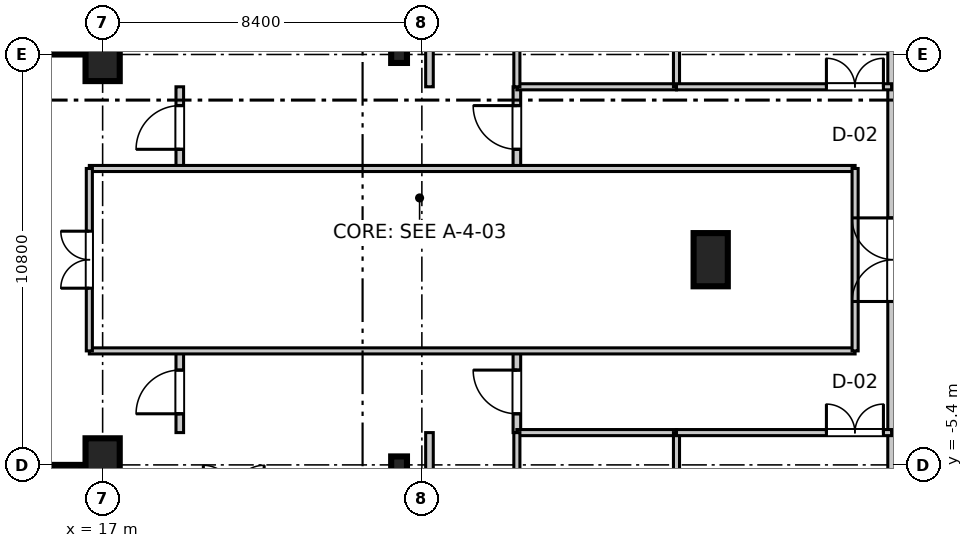
"""IFC4 building model, lengths in metres.
Left out: names, types, materials, properties, quantities, classifications, styles, units other than length and angle.
Written with IfcOpenShell. Run it as: python <this file> out.ifc"""

import sys

from ifc_helpers import new_model, si_unit, direction, frame, frame_2d, origin, origin_2d, place, context, subcontext, project, spatial, rectangle, i_section, extrude, source, transform, mapped, element, fill, save


model = new_model("IFC4")
c1 = context("Model", 3, precision=1e-05, world=origin(), true_north=direction((0.0, 1.0)))
c2 = subcontext(c1, "Body", "Model", "MODEL_VIEW")
j1 = project(units=[si_unit("LENGTHUNIT", "METRE"), si_unit("PLANEANGLEUNIT", "RADIAN")], contexts=[c1])
p1 = place(None, origin())
s1 = spatial("IfcSite", under=j1, at=p1, CompositionType="ELEMENT")
p2 = place(p1, origin())
s2 = spatial("IfcBuilding", under=s1, at=p2, CompositionType="ELEMENT")
p3 = place(p2, origin())
s3 = spatial("IfcBuildingStorey", under=s2, at=p3, CompositionType="ELEMENT", Elevation=0.0)
m1 = source(origin(), c2, "Body", "SweptSolid", [
    extrude(rectangle(XDim=0.9, YDim=1.4, at=origin_2d()), origin(), (0.0, 0.0, 1.0), 5.355),
])
for number, where, z_axis, x_axis in (
    (1, (17.0, -5.4, 0.0), (0.0, 0.0, 1.0), (1.0, 0.0, 0.0)),
    (2, (17.0, 5.4, 0.0), (0.0, 0.0, 1.0), (1.0, 0.0, 0.0)),
    (3, (33.0, 0.0, 0.0), (0.0, 0.0, 1.0), (1.0, 0.0, 0.0)),
):
    element("IfcColumn", number, at=place(p3, frame(where, z_axis=z_axis, x_axis=x_axis)), inside=s3, PredefinedType="PILASTER", context=c2, shape_type="MappedRepresentation", body=[
        mapped(m1, transform((0.0, 0.0, 0.0), scale=1.0)),
    ])
m2 = source(origin(), c2, "Body", "SweptSolid", [
    extrude(i_section(OverallWidth=0.416, OverallDepth=0.446, WebThickness=0.025, FlangeThickness=0.04, at=origin_2d()), origin(), (0.0, 0.0, 1.0), 5.355),
])
for number, where, z_axis, x_axis in (
    (4, (24.8, -5.4, 0.0), (0.0, 0.0, 1.0), (1.0, 0.0, 0.0)),
    (5, (24.8, 5.4, 0.0), (0.0, 0.0, 1.0), (1.0, 0.0, 0.0)),
):
    element("IfcColumn", number, at=place(p3, frame(where, z_axis=z_axis, x_axis=x_axis)), inside=s3, PredefinedType="COLUMN", context=c2, shape_type="MappedRepresentation", body=[
        mapped(m2, transform((0.0, 0.0, 0.0), scale=1.0)),
    ])
m3 = source(origin(), c2, "Body", "SweptSolid", [
    extrude(rectangle(XDim=11.6, YDim=0.8, at=frame_2d((5.8, 0.0))), origin(), (0.0, 0.0, 1.0), 5.08),
])
for number, where, z_axis, x_axis in (
    (6, (16.05, 5.4, 0.0), (0.0, 0.0, 1.0), (0.0, 1.0, 0.0)),
    (7, (16.05, -17.0, 0.0), (0.0, 0.0, 1.0), (0.0, 1.0, 0.0)),
):
    element("IfcWall", number, at=place(p3, frame(where, z_axis=z_axis, x_axis=x_axis)), inside=s3, PredefinedType="SHEAR", context=c2, shape_type="MappedRepresentation", body=[
        mapped(m3, transform((0.0, 0.0, 0.0), scale=1.0)),
    ])
m4 = source(origin(), c2, "Body", "SweptSolid", [
    extrude(rectangle(XDim=20.0, YDim=0.32, at=frame_2d((10.0, 0.0))), origin(), (0.0, 0.0, 1.0), 5.08),
])
p4 = place(p3, frame((37.82, -10.0, 0.0), z_axis=(0.0, 0.0, 1.0), x_axis=(0.0, 1.0, 0.0)))
e8 = element("IfcWall", 8, at=p4, inside=s3, PredefinedType="STANDARD", context=c2, shape_type="MappedRepresentation", body=[
    mapped(m4, transform((0.0, 0.0, 0.0), scale=1.0)),
])
p5 = place(p4, frame((8.9, 0.0, 0.0)))
e9 = element("IfcOpeningElement", 9, at=p5, cuts=e8, PredefinedType="OPENING", context=c2, shape_type="SweptSolid", body=[
    extrude(rectangle(XDim=2.2, YDim=2.6, at=frame_2d((1.1, 1.3))), frame((0.0, 0.17, 0.0), z_axis=(0.0, -1.0, 0.0), x_axis=(1.0, 0.0, 0.0)), (0.0, 0.0, 1.0), 0.34),
])
m5 = source(origin(), c2, "Body", "SweptSolid", [
    extrude(rectangle(XDim=2.15, YDim=0.2, at=frame_2d((1.075, 0.0))), origin(), (0.0, 0.0, 1.0), 3.4),
])
p6 = place(p3, frame((19.03, 2.4, 0.0), z_axis=(0.0, 0.0, 1.0), x_axis=(0.0, 1.0, 0.0)))
e10 = element("IfcWall", 10, at=p6, inside=s3, PredefinedType="PARTITIONING", context=c2, shape_type="MappedRepresentation", body=[
    mapped(m5, transform((0.0, 0.0, 0.0), scale=1.0)),
])
p7 = place(p6, frame((0.505, 0.0, 0.0)))
e11 = element("IfcOpeningElement", 11, at=p7, cuts=e10, PredefinedType="OPENING", context=c2, shape_type="SweptSolid", body=[
    extrude(rectangle(XDim=1.15, YDim=2.15, at=frame_2d((0.575, 1.075))), frame((0.0, 0.11, 0.0), z_axis=(0.0, -1.0, 0.0), x_axis=(1.0, 0.0, 0.0)), (0.0, 0.0, 1.0), 0.22),
])
m6 = source(origin(), c2, "Body", "SweptSolid", [
    extrude(rectangle(XDim=19.21, YDim=0.2, at=frame_2d((9.605, 0.0))), origin(), (0.0, 0.0, 1.0), 3.4),
])
p8 = place(p3, frame((25.6, 4.55, 0.0), z_axis=(0.0, 0.0, 1.0), x_axis=(0.0, 1.0, 0.0)))
e12 = element("IfcWall", 12, at=p8, inside=s3, PredefinedType="PARTITIONING", context=c2, shape_type="MappedRepresentation", body=[
    mapped(m6, transform((0.0, 0.0, 0.0), scale=1.0)),
])
p9 = place(p3, frame((27.9, 2.4, 0.0), z_axis=(0.0, 0.0, 1.0), x_axis=(0.0, 1.0, 0.0)))
e13 = element("IfcWall", 13, at=p9, inside=s3, PredefinedType="PARTITIONING", context=c2, shape_type="MappedRepresentation", body=[
    mapped(m5, transform((0.0, 0.0, 0.0), scale=1.0)),
])
p10 = place(p9, frame((0.505, 0.0, 0.0)))
e14 = element("IfcOpeningElement", 14, at=p10, cuts=e13, PredefinedType="OPENING", context=c2, shape_type="SweptSolid", body=[
    extrude(rectangle(XDim=1.15, YDim=2.15, at=frame_2d((0.575, 1.075))), frame((0.0, 0.11, 0.0), z_axis=(0.0, -1.0, 0.0), x_axis=(1.0, 0.0, 0.0)), (0.0, 0.0, 1.0), 0.22),
])
p11 = place(p3, frame((19.03, -4.55, 0.0), z_axis=(0.0, 0.0, 1.0), x_axis=(0.0, 1.0, 0.0)))
e15 = element("IfcWall", 15, at=p11, inside=s3, PredefinedType="PARTITIONING", context=c2, shape_type="MappedRepresentation", body=[
    mapped(m5, transform((0.0, 0.0, 0.0), scale=1.0)),
])
p12 = place(p11, frame((0.495, 0.0, 0.0)))
e16 = element("IfcOpeningElement", 16, at=p12, cuts=e15, PredefinedType="OPENING", context=c2, shape_type="SweptSolid", body=[
    extrude(rectangle(XDim=1.15, YDim=2.15, at=frame_2d((0.575, 1.075))), frame((0.0, 0.11, 0.0), z_axis=(0.0, -1.0, 0.0), x_axis=(1.0, 0.0, 0.0)), (0.0, 0.0, 1.0), 0.22),
])
p13 = place(p3, frame((25.6, -23.76, 0.0), z_axis=(0.0, 0.0, 1.0), x_axis=(0.0, 1.0, 0.0)))
e17 = element("IfcWall", 17, at=p13, inside=s3, PredefinedType="PARTITIONING", context=c2, shape_type="MappedRepresentation", body=[
    mapped(m6, transform((0.0, 0.0, 0.0), scale=1.0)),
])
p14 = place(p3, frame((27.9, -4.55, 0.0), z_axis=(0.0, 0.0, 1.0), x_axis=(0.0, 1.0, 0.0)))
e18 = element("IfcWall", 18, at=p14, inside=s3, PredefinedType="PARTITIONING", context=c2, shape_type="MappedRepresentation", body=[
    mapped(m5, transform((0.0, 0.0, 0.0), scale=1.0)),
])
p15 = place(p14, frame((0.495, 0.0, 0.0)))
e19 = element("IfcOpeningElement", 19, at=p15, cuts=e18, PredefinedType="OPENING", context=c2, shape_type="SweptSolid", body=[
    extrude(rectangle(XDim=1.15, YDim=2.15, at=frame_2d((0.575, 1.075))), frame((0.0, 0.11, 0.0), z_axis=(0.0, -1.0, 0.0), x_axis=(1.0, 0.0, 0.0)), (0.0, 0.0, 1.0), 0.22),
])
m7 = source(origin(), c2, "Body", "SweptSolid", [
    extrude(rectangle(XDim=20.15, YDim=0.16, at=frame_2d((10.075, 0.0))), origin(), (0.0, 0.0, 1.0), 3.4),
])
for number, where, z_axis, x_axis in (
    (20, (16.65, -2.4, 0.0), (0.0, 0.0, 1.0), (1.0, 0.0, 0.0)),
    (21, (16.65, 2.4, 0.0), (0.0, 0.0, 1.0), (1.0, 0.0, 0.0)),
):
    element("IfcWall", number, at=place(p3, frame(where, z_axis=z_axis, x_axis=x_axis)), inside=s3, PredefinedType="PARTITIONING", context=c2, shape_type="MappedRepresentation", body=[
        mapped(m7, transform((0.0, 0.0, 0.0), scale=1.0)),
    ])
m8 = source(origin(), c2, "Body", "SweptSolid", [
    extrude(rectangle(XDim=4.8, YDim=0.16, at=frame_2d((2.4, 0.0))), origin(), (0.0, 0.0, 1.0), 3.4),
])
p16 = place(p3, frame((16.65, -2.4, 0.0), z_axis=(0.0, 0.0, 1.0), x_axis=(0.0, 1.0, 0.0)))
e22 = element("IfcWall", 22, at=p16, inside=s3, PredefinedType="PARTITIONING", context=c2, shape_type="MappedRepresentation", body=[
    mapped(m8, transform((0.0, 0.0, 0.0), scale=1.0)),
])
p17 = place(p16, frame((1.65, 0.0, 0.0)))
e23 = element("IfcOpeningElement", 23, at=p17, cuts=e22, PredefinedType="OPENING", context=c2, shape_type="SweptSolid", body=[
    extrude(rectangle(XDim=1.5, YDim=2.15, at=frame_2d((0.75, 1.075))), frame((0.0, 0.09, 0.0), z_axis=(0.0, -1.0, 0.0), x_axis=(1.0, 0.0, 0.0)), (0.0, 0.0, 1.0), 0.18),
])
p18 = place(p3, frame((36.8, -2.4, 0.0), z_axis=(0.0, 0.0, 1.0), x_axis=(0.0, 1.0, 0.0)))
e24 = element("IfcWall", 24, at=p18, inside=s3, PredefinedType="PARTITIONING", context=c2, shape_type="MappedRepresentation", body=[
    mapped(m8, transform((0.0, 0.0, 0.0), scale=1.0)),
])
m9 = source(origin(), c2, "Body", "SweptSolid", [
    extrude(rectangle(XDim=4.2, YDim=0.16, at=frame_2d((2.1, 0.0))), origin(), (0.0, 0.0, 1.0), 3.4),
])
p19 = place(p3, frame((27.9, 4.55, 0.0), z_axis=(0.0, 0.0, 1.0), x_axis=(1.0, 0.0, 0.0)))
e25 = element("IfcWall", 25, at=p19, inside=s3, PredefinedType="PARTITIONING", context=c2, shape_type="MappedRepresentation", body=[
    mapped(m9, transform((0.0, 0.0, 0.0), scale=1.0)),
])
m10 = source(origin(), c2, "Body", "SweptSolid", [
    extrude(rectangle(XDim=19.21, YDim=0.16, at=frame_2d((9.605, 0.0))), origin(), (0.0, 0.0, 1.0), 3.4),
])
p20 = place(p3, frame((27.9, 4.55, 0.0), z_axis=(0.0, 0.0, 1.0), x_axis=(0.0, 1.0, 0.0)))
e26 = element("IfcWall", 26, at=p20, inside=s3, PredefinedType="PARTITIONING", context=c2, shape_type="MappedRepresentation", body=[
    mapped(m10, transform((0.0, 0.0, 0.0), scale=1.0)),
])
p21 = place(p20, frame((5.531, 0.0, 0.0)))
e27 = element("IfcOpeningElement", 27, at=p21, cuts=e26, PredefinedType="OPENING", context=c2, shape_type="SweptSolid", body=[
    extrude(rectangle(XDim=1.5, YDim=2.15, at=frame_2d((0.75, 1.075))), frame((0.0, 0.09, 0.0), z_axis=(0.0, -1.0, 0.0), x_axis=(1.0, 0.0, 0.0)), (0.0, 0.0, 1.0), 0.18),
])
p22 = place(p3, frame((32.1, 4.55, 0.0), z_axis=(0.0, 0.0, 1.0), x_axis=(0.0, 1.0, 0.0)))
e28 = element("IfcWall", 28, at=p22, inside=s3, PredefinedType="PARTITIONING", context=c2, shape_type="MappedRepresentation", body=[
    mapped(m10, transform((0.0, 0.0, 0.0), scale=1.0)),
])
m11 = source(origin(), c2, "Body", "SweptSolid", [
    extrude(rectangle(XDim=5.66, YDim=0.16, at=frame_2d((2.83, 0.0))), origin(), (0.0, 0.0, 1.0), 3.4),
])
p23 = place(p3, frame((32.1, 4.55, 0.0), z_axis=(0.0, 0.0, 1.0), x_axis=(1.0, 0.0, 0.0)))
e29 = element("IfcWall", 29, at=p23, inside=s3, PredefinedType="PARTITIONING", context=c2, shape_type="MappedRepresentation", body=[
    mapped(m11, transform((0.0, 0.0, 0.0), scale=1.0)),
])
p24 = place(p23, frame((3.945, 0.0, 0.0)))
e30 = element("IfcOpeningElement", 30, at=p24, cuts=e29, PredefinedType="OPENING", context=c2, shape_type="SweptSolid", body=[
    extrude(rectangle(XDim=1.5, YDim=2.15, at=frame_2d((0.75, 1.075))), frame((0.0, 0.09, 0.0), z_axis=(0.0, -1.0, 0.0), x_axis=(1.0, 0.0, 0.0)), (0.0, 0.0, 1.0), 0.18),
])
p25 = place(p3, frame((27.9, -4.55, 0.0), z_axis=(0.0, 0.0, 1.0), x_axis=(1.0, 0.0, 0.0)))
e31 = element("IfcWall", 31, at=p25, inside=s3, PredefinedType="PARTITIONING", context=c2, shape_type="MappedRepresentation", body=[
    mapped(m9, transform((0.0, 0.0, 0.0), scale=1.0)),
])
p26 = place(p3, frame((27.9, -23.76, 0.0), z_axis=(0.0, 0.0, 1.0), x_axis=(0.0, 1.0, 0.0)))
e32 = element("IfcWall", 32, at=p26, inside=s3, PredefinedType="PARTITIONING", context=c2, shape_type="MappedRepresentation", body=[
    mapped(m10, transform((0.0, 0.0, 0.0), scale=1.0)),
])
p27 = place(p26, frame((12.439, 0.0, 0.0)))
e33 = element("IfcOpeningElement", 33, at=p27, cuts=e32, PredefinedType="OPENING", context=c2, shape_type="SweptSolid", body=[
    extrude(rectangle(XDim=0.98, YDim=2.1, at=frame_2d((0.49, 1.05))), frame((0.0, 0.09, 0.0), z_axis=(0.0, -1.0, 0.0), x_axis=(1.0, 0.0, 0.0)), (0.0, 0.0, 1.0), 0.18),
])
p28 = place(p3, frame((32.1, -23.76, 0.0), z_axis=(0.0, 0.0, 1.0), x_axis=(0.0, 1.0, 0.0)))
e34 = element("IfcWall", 34, at=p28, inside=s3, PredefinedType="PARTITIONING", context=c2, shape_type="MappedRepresentation", body=[
    mapped(m10, transform((0.0, 0.0, 0.0), scale=1.0)),
])
p29 = place(p3, frame((32.1, -4.55, 0.0), z_axis=(0.0, 0.0, 1.0), x_axis=(1.0, 0.0, 0.0)))
e35 = element("IfcWall", 35, at=p29, inside=s3, PredefinedType="PARTITIONING", context=c2, shape_type="MappedRepresentation", body=[
    mapped(m11, transform((0.0, 0.0, 0.0), scale=1.0)),
])
p30 = place(p29, frame((3.945, 0.0, 0.0)))
e36 = element("IfcOpeningElement", 36, at=p30, cuts=e35, PredefinedType="OPENING", context=c2, shape_type="SweptSolid", body=[
    extrude(rectangle(XDim=1.5, YDim=2.15, at=frame_2d((0.75, 1.075))), frame((0.0, 0.09, 0.0), z_axis=(0.0, -1.0, 0.0), x_axis=(1.0, 0.0, 0.0)), (0.0, 0.0, 1.0), 0.18),
])
m12 = source(origin(), c2, "Body", "SweptSolid", [
    extrude(rectangle(XDim=2.2, YDim=2.6, at=frame_2d((1.1, 1.3))), frame((0.0, 0.025, 0.0), z_axis=(0.0, -1.0, 0.0), x_axis=(1.0, 0.0, 0.0)), (0.0, 0.0, 1.0), 0.05),
])
p31 = place(p5, frame((2.2, 0.0, 0.0), z_axis=(0.0, 0.0, 1.0), x_axis=(-1.0, 0.0, 0.0)))
e37 = element("IfcDoor", 37, at=p31, inside=s3, OperationType="DOUBLE_DOOR_SINGLE_SWING", PredefinedType="DOOR", context=c2, shape_type="MappedRepresentation", body=[
    mapped(m12, transform((0.0, 0.0, 0.0), scale=1.0)),
])
fill(e9, e37)
m13 = source(origin(), c2, "Body", "SweptSolid", [
    extrude(rectangle(XDim=1.15, YDim=2.15, at=frame_2d((0.575, 1.075))), frame((0.0, 0.025, 0.0), z_axis=(0.0, -1.0, 0.0), x_axis=(1.0, 0.0, 0.0)), (0.0, 0.0, 1.0), 0.05),
])
p32 = place(p7, frame((1.15, 0.0, 0.0), z_axis=(0.0, 0.0, 1.0), x_axis=(-1.0, 0.0, 0.0)))
e38 = element("IfcDoor", 38, at=p32, inside=s3, OperationType="SINGLE_SWING_LEFT", PredefinedType="DOOR", context=c2, shape_type="MappedRepresentation", body=[
    mapped(m13, transform((0.0, 0.0, 0.0), scale=1.0)),
])
fill(e11, e38)
p33 = place(p10, origin())
e39 = element("IfcDoor", 39, at=p33, inside=s3, OperationType="SINGLE_SWING_RIGHT", PredefinedType="DOOR", context=c2, shape_type="MappedRepresentation", body=[
    mapped(m13, transform((0.0, 0.0, 0.0), scale=1.0)),
])
fill(e14, e39)
p34 = place(p12, frame((1.15, 0.0, 0.0), z_axis=(0.0, 0.0, 1.0), x_axis=(-1.0, 0.0, 0.0)))
e40 = element("IfcDoor", 40, at=p34, inside=s3, OperationType="SINGLE_SWING_LEFT", PredefinedType="DOOR", context=c2, shape_type="MappedRepresentation", body=[
    mapped(m13, transform((0.0, 0.0, 0.0), scale=1.0)),
])
fill(e16, e40)
p35 = place(p15, origin())
e41 = element("IfcDoor", 41, at=p35, inside=s3, OperationType="SINGLE_SWING_RIGHT", PredefinedType="DOOR", context=c2, shape_type="MappedRepresentation", body=[
    mapped(m13, transform((0.0, 0.0, 0.0), scale=1.0)),
])
fill(e19, e41)
m14 = source(origin(), c2, "Body", "SweptSolid", [
    extrude(rectangle(XDim=1.5, YDim=2.15, at=frame_2d((0.75, 1.075))), frame((0.0, 0.025, 0.0), z_axis=(0.0, -1.0, 0.0), x_axis=(1.0, 0.0, 0.0)), (0.0, 0.0, 1.0), 0.05),
])
p36 = place(p17, frame((1.5, 0.0, 0.0), z_axis=(0.0, 0.0, 1.0), x_axis=(-1.0, 0.0, 0.0)))
e42 = element("IfcDoor", 42, at=p36, inside=s3, OperationType="DOUBLE_DOOR_SINGLE_SWING", PredefinedType="DOOR", context=c2, shape_type="MappedRepresentation", body=[
    mapped(m14, transform((0.0, 0.0, 0.0), scale=1.0)),
])
fill(e23, e42)
p37 = place(p24, origin())
e43 = element("IfcDoor", 43, at=p37, inside=s3, OperationType="DOUBLE_DOOR_SINGLE_SWING", PredefinedType="DOOR", context=c2, shape_type="MappedRepresentation", body=[
    mapped(m14, transform((0.0, 0.0, 0.0), scale=1.0)),
])
fill(e30, e43)
p38 = place(p30, frame((1.5, 0.0, 0.0), z_axis=(0.0, 0.0, 1.0), x_axis=(-1.0, 0.0, 0.0)))
e44 = element("IfcDoor", 44, at=p38, inside=s3, OperationType="DOUBLE_DOOR_SINGLE_SWING", PredefinedType="DOOR", context=c2, shape_type="MappedRepresentation", body=[
    mapped(m14, transform((0.0, 0.0, 0.0), scale=1.0)),
])
fill(e36, e44)
save(model, sys.argv[1])
